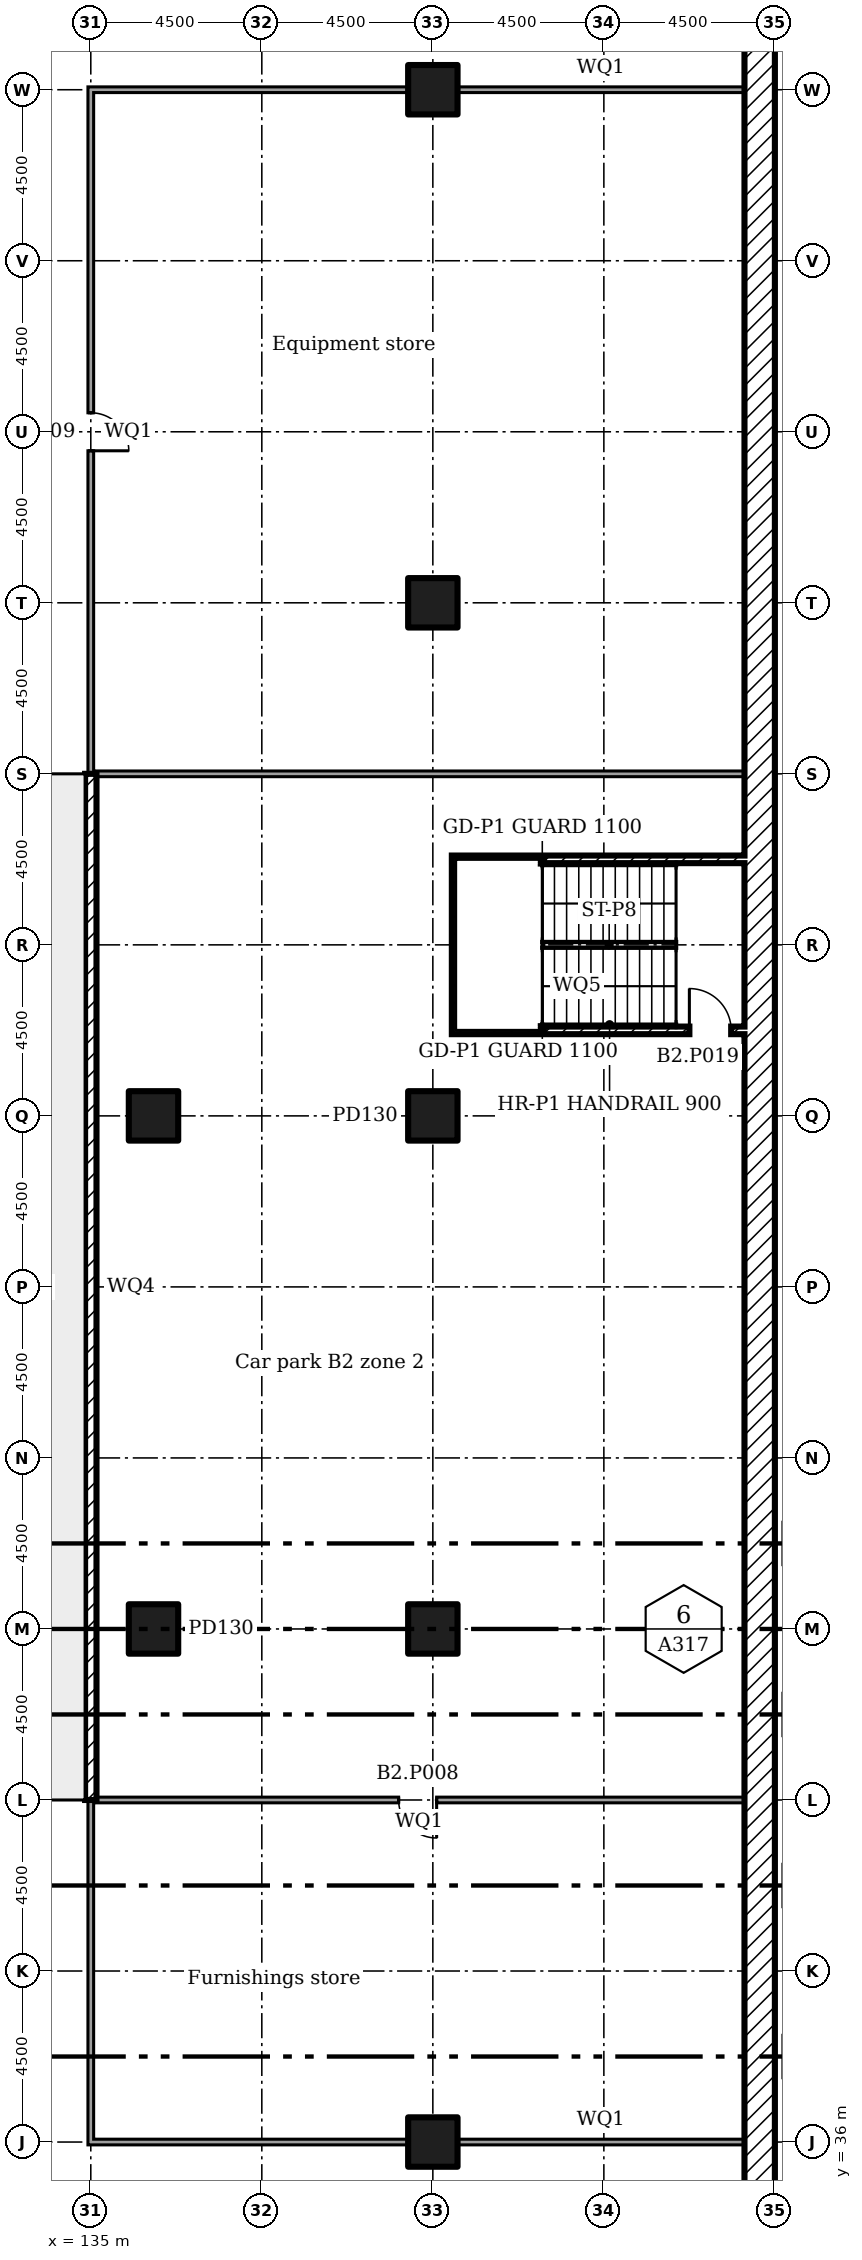
"""IFC4 building model, lengths in metres.
Left out: names, types, materials, properties, quantities, classifications, styles, units other than length and angle.
Written with IfcOpenShell. Run it as: python <this file> out.ifc"""

import sys

from ifc_helpers import new_model, si_unit, direction, frame, frame_2d, origin, origin_2d, place, context, subcontext, project, spatial, rectangle, extrude, element, fill, save


model = new_model("IFC4")
c1 = context("Model", 3, precision=1e-05, world=origin(), true_north=direction((0.0, 1.0)))
c2 = subcontext(c1, "Body", "Model", "MODEL_VIEW")
j1 = project(units=[si_unit("LENGTHUNIT", "METRE"), si_unit("PLANEANGLEUNIT", "RADIAN")], contexts=[c1])
p1 = place(None, origin())
s1 = spatial("IfcSite", under=j1, at=p1, CompositionType="ELEMENT")
p2 = place(p1, origin())
s2 = spatial("IfcBuilding", under=s1, at=p2, CompositionType="ELEMENT")
p3 = place(p2, frame((0.0, 0.0, -8.0)))
s3 = spatial("IfcBuildingStorey", under=s2, at=p3, CompositionType="ELEMENT", Elevation=-8.0)
for number, where in (
    (1, (136.65, 49.5, 0.0)),
    (2, (136.65, 63.0, 0.0)),
    (3, (144.0, 36.0, 0.0)),
    (4, (144.0, 49.5, 0.0)),
    (5, (144.0, 63.0, 0.0)),
    (6, (144.0, 76.5, 0.0)),
    (7, (144.0, 90.0, 0.0)),
):
    element("IfcColumn", number, at=place(p3, frame(where)), inside=s3, PredefinedType="COLUMN", context=c2, shape_type="SweptSolid", body=[
        extrude(rectangle(XDim=1.3, YDim=1.3, at=origin_2d()), origin(), (0.0, 0.0, 1.0), 4.0),
    ])
p4 = place(p3, frame((152.6, 0.8, 0.0), z_axis=(0.0, 0.0, 1.0), x_axis=(0.0, 1.0, 0.0)))
e8 = element("IfcWall", 8, at=p4, inside=s3, PredefinedType="SOLIDWALL", context=c2, shape_type="SweptSolid", body=[
    extrude(rectangle(XDim=97.4, YDim=0.8, at=frame_2d((48.7, 0.0))), origin(), (0.0, 0.0, 1.0), 4.0),
])
p5 = place(p3, frame((135.0, 35.925, 0.0), z_axis=(0.0, 0.0, 1.0), x_axis=(0.0, 1.0, 0.0)))
e9 = element("IfcWall", 9, at=p5, inside=s3, PredefinedType="PARTITIONING", context=c2, shape_type="SweptSolid", body=[
    extrude(rectangle(XDim=9.15, YDim=0.15, at=frame_2d((4.575, 0.0))), origin(), (0.0, 0.0, 1.0), 3.55),
])
p6 = place(p3, frame((135.075, 36.0, 0.0)))
e10 = element("IfcWall", 10, at=p6, inside=s3, PredefinedType="PARTITIONING", context=c2, shape_type="SweptSolid", body=[
    extrude(rectangle(XDim=8.28, YDim=0.15, at=frame_2d((4.14, 0.0))), origin(), (0.0, 0.0, 1.0), 3.55),
])
p7 = place(p3, frame((144.645, 36.0, 0.0)))
e11 = element("IfcWall", 11, at=p7, inside=s3, PredefinedType="PARTITIONING", context=c2, shape_type="SweptSolid", body=[
    extrude(rectangle(XDim=7.555, YDim=0.15, at=frame_2d((3.777, 0.0))), origin(), (0.0, 0.0, 1.0), 3.55),
])
p8 = place(p3, frame((135.075, 45.0, 0.0)))
e12 = element("IfcWall", 12, at=p8, inside=s3, PredefinedType="PARTITIONING", context=c2, shape_type="SweptSolid", body=[
    extrude(rectangle(XDim=17.125, YDim=0.15, at=frame_2d((8.562, 0.0))), origin(), (0.0, 0.0, 1.0), 3.55),
])
p9 = place(p8, frame((8.025, 0.0, 0.0)))
e13 = element("IfcOpeningElement", 13, at=p9, cuts=e12, PredefinedType="OPENING", context=c2, shape_type="SweptSolid", body=[
    extrude(rectangle(XDim=1.0, YDim=2.1, at=frame_2d((0.5, 1.05))), frame((0.0, 0.085, 0.0), z_axis=(0.0, -1.0, 0.0), x_axis=(1.0, 0.0, 0.0)), (0.0, 0.0, 1.0), 0.17),
])
p10 = place(p3, frame((135.0, 71.925, 0.0), z_axis=(0.0, 0.0, 1.0), x_axis=(0.0, 1.0, 0.0)))
e14 = element("IfcWall", 14, at=p10, inside=s3, PredefinedType="PARTITIONING", context=c2, shape_type="SweptSolid", body=[
    extrude(rectangle(XDim=18.15, YDim=0.15, at=frame_2d((9.075, 0.0))), origin(), (0.0, 0.0, 1.0), 3.55),
])
p11 = place(p10, frame((8.575, 0.0, 0.0)))
e15 = element("IfcOpeningElement", 15, at=p11, cuts=e14, PredefinedType="OPENING", context=c2, shape_type="SweptSolid", body=[
    extrude(rectangle(XDim=1.0, YDim=2.1, at=frame_2d((0.5, 1.05))), frame((0.0, 0.085, 0.0), z_axis=(0.0, -1.0, 0.0), x_axis=(1.0, 0.0, 0.0)), (0.0, 0.0, 1.0), 0.17),
])
p12 = place(p3, frame((135.075, 90.0, 0.0)))
e16 = element("IfcWall", 16, at=p12, inside=s3, PredefinedType="PARTITIONING", context=c2, shape_type="SweptSolid", body=[
    extrude(rectangle(XDim=8.28, YDim=0.15, at=frame_2d((4.14, 0.0))), origin(), (0.0, 0.0, 1.0), 3.55),
])
p13 = place(p3, frame((144.645, 90.0, 0.0)))
e17 = element("IfcWall", 17, at=p13, inside=s3, PredefinedType="PARTITIONING", context=c2, shape_type="SweptSolid", body=[
    extrude(rectangle(XDim=7.555, YDim=0.15, at=frame_2d((3.777, 0.0))), origin(), (0.0, 0.0, 1.0), 3.55),
])
p14 = place(p3, frame((135.075, 72.0, 0.0)))
e18 = element("IfcWall", 18, at=p14, inside=s3, PredefinedType="PARTITIONING", context=c2, shape_type="SweptSolid", body=[
    extrude(rectangle(XDim=17.125, YDim=0.15, at=frame_2d((8.562, 0.0))), origin(), (0.0, 0.0, 1.0), 3.55),
])
p15 = place(p3, frame((144.6, 65.15, 0.0), z_axis=(0.0, 0.0, 1.0), x_axis=(0.0, 1.0, 0.0)))
e19 = element("IfcWall", 19, at=p15, inside=s3, PredefinedType="SOLIDWALL", context=c2, shape_type="SweptSolid", body=[
    extrude(rectangle(XDim=4.7, YDim=0.2, at=frame_2d((2.35, 0.0))), origin(), (0.0, 0.0, 1.0), 3.55),
])
p16 = place(p3, frame((144.7, 65.25, 0.0)))
e20 = element("IfcWall", 20, at=p16, inside=s3, PredefinedType="SOLIDWALL", context=c2, shape_type="SweptSolid", body=[
    extrude(rectangle(XDim=7.5, YDim=0.2, at=frame_2d((3.75, 0.0))), origin(), (0.0, 0.0, 1.0), 3.55),
])
p17 = place(p16, frame((6.05, 0.0, 0.0)))
e21 = element("IfcOpeningElement", 21, at=p17, cuts=e20, PredefinedType="OPENING", context=c2, shape_type="SweptSolid", body=[
    extrude(rectangle(XDim=1.1, YDim=2.1, at=frame_2d((0.55, 1.05))), frame((0.0, 0.11, 0.0), z_axis=(0.0, -1.0, 0.0), x_axis=(1.0, 0.0, 0.0)), (0.0, 0.0, 1.0), 0.22),
])
p18 = place(p3, frame((144.7, 69.75, 0.0)))
e22 = element("IfcWall", 22, at=p18, inside=s3, PredefinedType="SOLIDWALL", context=c2, shape_type="SweptSolid", body=[
    extrude(rectangle(XDim=7.5, YDim=0.2, at=frame_2d((3.75, 0.0))), origin(), (0.0, 0.0, 1.0), 3.55),
])
for number, where, z_axis, x_axis in (
    (23, (146.78, 65.35, 0.0), (0.0, 0.0, 1.0), (0.0, 1.0, 0.0)),
    (24, (145.3, 65.35, 0.0), (0.0, 0.0, 1.0), (0.0, 1.0, 0.0)),
):
    element("IfcWall", number, at=place(p3, frame(where, z_axis=z_axis, x_axis=x_axis)), inside=s3, PredefinedType="SOLIDWALL", context=c2, shape_type="SweptSolid", body=[
        extrude(rectangle(XDim=4.3, YDim=0.2, at=frame_2d((2.15, 0.0))), origin(), (0.0, 0.0, 1.0), 1.8),
    ])
p19 = place(p3, frame((135.0, 45.0, 0.0), z_axis=(0.0, 0.0, 1.0), x_axis=(0.0, 1.0, 0.0)))
e25 = element("IfcWall", 25, at=p19, inside=s3, PredefinedType="SOLIDWALL", context=c2, shape_type="SweptSolid", body=[
    extrude(rectangle(XDim=27.0, YDim=0.3, at=frame_2d((13.5, 0.0))), origin(), (0.0, 0.0, 1.0), 4.0),
])
p20 = place(p9, frame((1.0, 0.0, 0.0), x_axis=(-1.0, 0.0, 0.0)))
e26 = element("IfcDoor", 26, at=p20, inside=s3, OperationType="SINGLE_SWING_RIGHT", PredefinedType="DOOR", context=c2, shape_type="SweptSolid", body=[
    extrude(rectangle(XDim=1.0, YDim=2.1, at=frame_2d((0.5, 1.05))), frame((0.0, 0.025, 0.0), z_axis=(0.0, -1.0, 0.0), x_axis=(1.0, 0.0, 0.0)), (0.0, 0.0, 1.0), 0.05),
])
fill(e13, e26)
p21 = place(p11, frame((1.0, 0.0, 0.0), x_axis=(-1.0, 0.0, 0.0)))
e27 = element("IfcDoor", 27, at=p21, inside=s3, OperationType="SINGLE_SWING_LEFT", PredefinedType="DOOR", context=c2, shape_type="SweptSolid", body=[
    extrude(rectangle(XDim=1.0, YDim=2.1, at=frame_2d((0.5, 1.05))), frame((0.0, 0.025, 0.0), z_axis=(0.0, -1.0, 0.0), x_axis=(1.0, 0.0, 0.0)), (0.0, 0.0, 1.0), 0.05),
])
fill(e15, e27)
p22 = place(p17, origin())
e28 = element("IfcDoor", 28, at=p22, inside=s3, OperationType="SINGLE_SWING_RIGHT", PredefinedType="DOOR", context=c2, shape_type="SweptSolid", body=[
    extrude(rectangle(XDim=1.1, YDim=2.1, at=frame_2d((0.55, 1.05))), frame((0.0, 0.025, 0.0), z_axis=(0.0, -1.0, 0.0), x_axis=(1.0, 0.0, 0.0)), (0.0, 0.0, 1.0), 0.05),
])
fill(e21, e28)
save(model, sys.argv[1])
